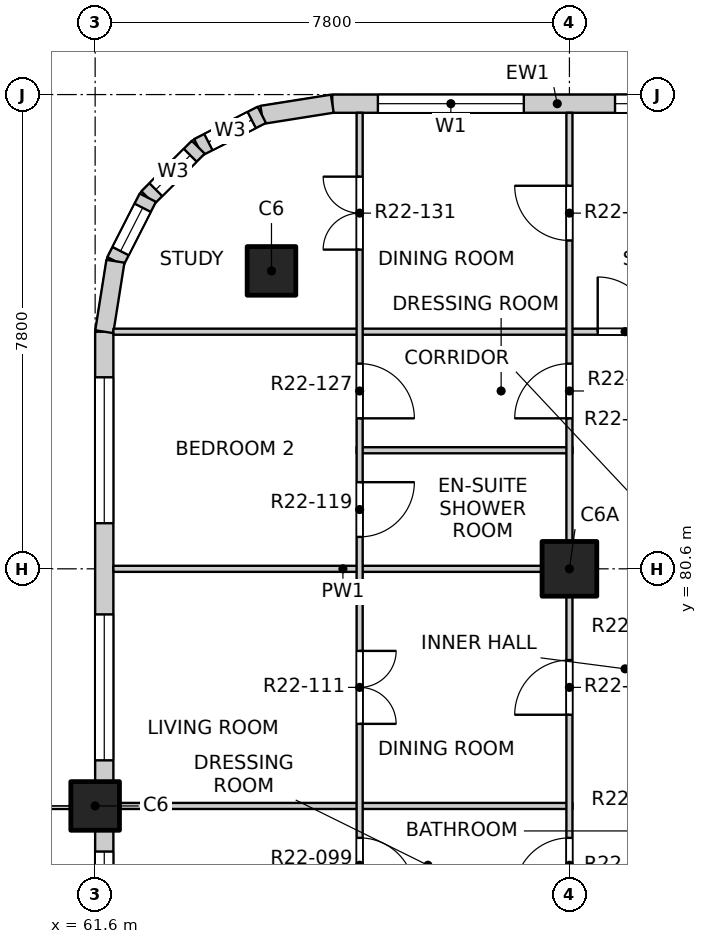
"""IFC4 building model, lengths in metres.
Left out: names, types, materials, properties, quantities, classifications, styles, units other than length and angle.
Written with IfcOpenShell. Run it as: python <this file> out.ifc"""

import sys

from ifc_helpers import new_model, si_unit, direction, frame, frame_2d, origin, origin_2d, place, context, subcontext, project, spatial, rectangle, extrude, element, fill, save


model = new_model("IFC4")
c1 = context("Model", 3, precision=1e-05, world=origin(), true_north=direction((0.0, 1.0)))
c2 = subcontext(c1, "Body", "Model", "MODEL_VIEW")
j1 = project(units=[si_unit("LENGTHUNIT", "METRE"), si_unit("PLANEANGLEUNIT", "RADIAN")], contexts=[c1])
p1 = place(None, origin())
s1 = spatial("IfcSite", under=j1, at=p1, CompositionType="ELEMENT")
p2 = place(p1, origin())
s2 = spatial("IfcBuilding", under=s1, at=p2, CompositionType="ELEMENT")
p3 = place(p2, frame((0.0, 0.0, 231.3)))
s3 = spatial("IfcBuildingStorey", under=s2, at=p3, CompositionType="ELEMENT", Elevation=231.3)
for number, where, z_axis, x_axis in (
    (1, (64.5, 85.5, -0.25), (0.0, 0.0, 1.0), (1.0, 0.0, 0.0)),
    (2, (61.6, 76.7, -0.25), (0.0, 0.0, 1.0), (1.0, 0.0, 0.0)),
):
    element("IfcColumn", number, at=place(p3, frame(where, z_axis=z_axis, x_axis=x_axis)), inside=s3, PredefinedType="COLUMN", context=c2, shape_type="SweptSolid", body=[
        extrude(rectangle(XDim=0.8, YDim=0.8, at=origin_2d()), origin(), (0.0, 0.0, 1.0), 3.4),
    ])
p4 = place(p3, frame((69.4, 80.6, -0.25), z_axis=(0.0, 0.0, 1.0), x_axis=(1.0, 0.0, 0.0)))
e3 = element("IfcColumn", 3, at=p4, inside=s3, PredefinedType="COLUMN", context=c2, shape_type="SweptSolid", body=[
    extrude(rectangle(XDim=0.9, YDim=0.9, at=origin_2d()), origin(), (0.0, 0.0, 1.0), 3.4),
])
p5 = place(p3, frame((65.5, 88.25, 0.0), z_axis=(0.0, 0.0, 1.0), x_axis=(1.0, 0.0, 0.0)))
e4 = element("IfcWall", 4, at=p5, inside=s3, PredefinedType="SOLIDWALL", context=c2, shape_type="SweptSolid", body=[
    extrude(rectangle(XDim=7.4, YDim=0.3, at=frame_2d((3.7, 0.0))), origin(), (0.0, 0.0, 1.0), 2.7),
])
p6 = place(p5, frame((0.75, 0.0, 0.9)))
e5 = element("IfcOpeningElement", 5, at=p6, cuts=e4, PredefinedType="OPENING", context=c2, shape_type="SweptSolid", body=[
    extrude(rectangle(XDim=2.4, YDim=1.8, at=frame_2d((1.2, 0.9))), frame((0.0, 0.16, 0.0), z_axis=(0.0, -1.0, 0.0), x_axis=(1.0, 0.0, 0.0)), (0.0, 0.0, 1.0), 0.32),
])
p7 = place(p5, frame((4.65, 0.0, 0.9)))
e6 = element("IfcOpeningElement", 6, at=p7, cuts=e4, PredefinedType="OPENING", context=c2, shape_type="SweptSolid", body=[
    extrude(rectangle(XDim=2.4, YDim=1.8, at=frame_2d((1.2, 0.9))), frame((0.0, 0.16, 0.0), z_axis=(0.0, -1.0, 0.0), x_axis=(1.0, 0.0, 0.0)), (0.0, 0.0, 1.0), 0.32),
])
p8 = place(p3, frame((61.75, 69.3, 0.0), z_axis=(0.0, 0.0, 1.0), x_axis=(0.0, 1.0, 0.0)))
e7 = element("IfcWall", 7, at=p8, inside=s3, PredefinedType="SOLIDWALL", context=c2, shape_type="SweptSolid", body=[
    extrude(rectangle(XDim=7.0, YDim=0.3, at=frame_2d((3.5, 0.0))), origin(), (0.0, 0.0, 1.0), 2.7),
])
p9 = place(p8, frame((0.65, 0.0, 0.0)))
e8 = element("IfcOpeningElement", 8, at=p9, cuts=e7, PredefinedType="OPENING", context=c2, shape_type="SweptSolid", body=[
    extrude(rectangle(XDim=1.8, YDim=2.4, at=frame_2d((0.9, 1.2))), frame((0.0, 0.16, 0.0), z_axis=(0.0, -1.0, 0.0), x_axis=(1.0, 0.0, 0.0)), (0.0, 0.0, 1.0), 0.32),
])
p10 = place(p8, frame((4.25, 0.0, 0.9)))
e9 = element("IfcOpeningElement", 9, at=p10, cuts=e7, PredefinedType="OPENING", context=c2, shape_type="SweptSolid", body=[
    extrude(rectangle(XDim=2.4, YDim=1.8, at=frame_2d((1.2, 0.9))), frame((0.0, 0.16, 0.0), z_axis=(0.0, -1.0, 0.0), x_axis=(1.0, 0.0, 0.0)), (0.0, 0.0, 1.0), 0.32),
])
p11 = place(p3, frame((61.75, 77.1, 0.0), z_axis=(0.0, 0.0, 1.0), x_axis=(0.0, 1.0, 0.0)))
e10 = element("IfcWall", 10, at=p11, inside=s3, PredefinedType="SOLIDWALL", context=c2, shape_type="SweptSolid", body=[
    extrude(rectangle(XDim=7.4, YDim=0.3, at=frame_2d((3.7, 0.0))), origin(), (0.0, 0.0, 1.0), 2.7),
])
p12 = place(p11, frame((0.35, 0.0, 0.9)))
e11 = element("IfcOpeningElement", 11, at=p12, cuts=e10, PredefinedType="OPENING", context=c2, shape_type="SweptSolid", body=[
    extrude(rectangle(XDim=2.4, YDim=1.8, at=frame_2d((1.2, 0.9))), frame((0.0, 0.16, 0.0), z_axis=(0.0, -1.0, 0.0), x_axis=(1.0, 0.0, 0.0)), (0.0, 0.0, 1.0), 0.32),
])
p13 = place(p11, frame((4.25, 0.0, 0.9)))
e12 = element("IfcOpeningElement", 12, at=p13, cuts=e10, PredefinedType="OPENING", context=c2, shape_type="SweptSolid", body=[
    extrude(rectangle(XDim=2.4, YDim=1.8, at=frame_2d((1.2, 0.9))), frame((0.0, 0.16, 0.0), z_axis=(0.0, -1.0, 0.0), x_axis=(1.0, 0.0, 0.0)), (0.0, 0.0, 1.0), 0.32),
])
p14 = place(p3, frame((65.5, 88.25, 0.0), z_axis=(0.0, 0.0, 1.0), x_axis=(-0.987678452879, -0.156496880861, 0.0)))
e13 = element("IfcWall", 13, at=p14, inside=s3, PredefinedType="SOLIDWALL", context=c2, shape_type="SweptSolid", body=[
    extrude(rectangle(XDim=1.173, YDim=0.3, at=frame_2d((0.586, 0.0))), origin(), (0.0, 0.0, 1.0), 2.7),
])
p15 = place(p3, frame((64.341, 88.066, 0.0), z_axis=(0.0, 0.0, 1.0), x_axis=(-0.890988677504, -0.454025524128, 0.0)))
e14 = element("IfcWall", 14, at=p15, inside=s3, PredefinedType="SOLIDWALL", context=c2, shape_type="SweptSolid", body=[
    extrude(rectangle(XDim=1.173, YDim=0.3, at=frame_2d((0.587, 0.0))), origin(), (0.0, 0.0, 1.0), 2.7),
])
p16 = place(p15, frame((0.187, 0.0, 0.9)))
e15 = element("IfcOpeningElement", 15, at=p16, cuts=e14, PredefinedType="OPENING", context=c2, shape_type="SweptSolid", body=[
    extrude(rectangle(XDim=0.8, YDim=1.2, at=frame_2d((0.4, 0.6))), frame((0.0, 0.16, 0.0), z_axis=(0.0, -1.0, 0.0), x_axis=(1.0, 0.0, 0.0)), (0.0, 0.0, 1.0), 0.32),
])
p17 = place(p3, frame((63.296, 87.534, 0.0), z_axis=(0.0, 0.0, 1.0), x_axis=(-0.707106781187, -0.707106781187, 0.0)))
e16 = element("IfcWall", 16, at=p17, inside=s3, PredefinedType="SOLIDWALL", context=c2, shape_type="SweptSolid", body=[
    extrude(rectangle(XDim=1.173, YDim=0.3, at=frame_2d((0.586, 0.0))), origin(), (0.0, 0.0, 1.0), 2.7),
])
p18 = place(p17, frame((0.187, 0.0, 0.9)))
e17 = element("IfcOpeningElement", 17, at=p18, cuts=e16, PredefinedType="OPENING", context=c2, shape_type="SweptSolid", body=[
    extrude(rectangle(XDim=0.8, YDim=1.2, at=frame_2d((0.4, 0.6))), frame((0.0, 0.16, 0.0), z_axis=(0.0, -1.0, 0.0), x_axis=(1.0, 0.0, 0.0)), (0.0, 0.0, 1.0), 0.32),
])
p19 = place(p3, frame((62.466, 86.704, 0.0), z_axis=(0.0, 0.0, 1.0), x_axis=(-0.454025524128, -0.890988677504, 0.0)))
e18 = element("IfcWall", 18, at=p19, inside=s3, PredefinedType="SOLIDWALL", context=c2, shape_type="SweptSolid", body=[
    extrude(rectangle(XDim=1.173, YDim=0.3, at=frame_2d((0.587, 0.0))), origin(), (0.0, 0.0, 1.0), 2.7),
])
p20 = place(p19, frame((0.187, 0.0, 0.9)))
e19 = element("IfcOpeningElement", 19, at=p20, cuts=e18, PredefinedType="OPENING", context=c2, shape_type="SweptSolid", body=[
    extrude(rectangle(XDim=0.8, YDim=1.2, at=frame_2d((0.4, 0.6))), frame((0.0, 0.16, 0.0), z_axis=(0.0, -1.0, 0.0), x_axis=(1.0, 0.0, 0.0)), (0.0, 0.0, 1.0), 0.32),
])
p21 = place(p3, frame((61.934, 85.659, 0.0), z_axis=(0.0, 0.0, 1.0), x_axis=(-0.156496880861, -0.987678452879, 0.0)))
e20 = element("IfcWall", 20, at=p21, inside=s3, PredefinedType="SOLIDWALL", context=c2, shape_type="SweptSolid", body=[
    extrude(rectangle(XDim=1.173, YDim=0.3, at=frame_2d((0.586, 0.0))), origin(), (0.0, 0.0, 1.0), 2.7),
])
p22 = place(p3, frame((61.9, 76.7, 0.0), z_axis=(0.0, 0.0, 1.0), x_axis=(1.0, 0.0, 0.0)))
e21 = element("IfcWall", 21, at=p22, inside=s3, PredefinedType="PARTITIONING", context=c2, shape_type="SweptSolid", body=[
    extrude(rectangle(XDim=7.55, YDim=0.1, at=frame_2d((3.775, 0.0))), origin(), (0.0, 0.0, 1.0), 2.55),
])
p23 = place(p3, frame((61.9, 80.6, 0.0), z_axis=(0.0, 0.0, 1.0), x_axis=(1.0, 0.0, 0.0)))
e22 = element("IfcWall", 22, at=p23, inside=s3, PredefinedType="PARTITIONING", context=c2, shape_type="SweptSolid", body=[
    extrude(rectangle(XDim=7.55, YDim=0.1, at=frame_2d((3.775, 0.0))), origin(), (0.0, 0.0, 1.0), 3.15),
])
p24 = place(p3, frame((65.9, 82.55, 0.0), z_axis=(0.0, 0.0, 1.0), x_axis=(1.0, 0.0, 0.0)))
e23 = element("IfcWall", 23, at=p24, inside=s3, PredefinedType="PARTITIONING", context=c2, shape_type="SweptSolid", body=[
    extrude(rectangle(XDim=3.55, YDim=0.1, at=frame_2d((1.775, 0.0))), origin(), (0.0, 0.0, 1.0), 3.15),
])
p25 = place(p3, frame((61.9, 84.5, 0.0), z_axis=(0.0, 0.0, 1.0), x_axis=(1.0, 0.0, 0.0)))
e24 = element("IfcWall", 24, at=p25, inside=s3, PredefinedType="PARTITIONING", context=c2, shape_type="SweptSolid", body=[
    extrude(rectangle(XDim=11.5, YDim=0.1, at=frame_2d((5.75, 0.0))), origin(), (0.0, 0.0, 1.0), 3.15),
])
p26 = place(p25, frame((7.965, 0.0, 0.0)))
e25 = element("IfcOpeningElement", 25, at=p26, cuts=e24, PredefinedType="OPENING", context=c2, shape_type="SweptSolid", body=[
    extrude(rectangle(XDim=0.9, YDim=2.1, at=frame_2d((0.45, 1.05))), frame((0.0, 0.06, 0.0), z_axis=(0.0, -1.0, 0.0), x_axis=(1.0, 0.0, 0.0)), (0.0, 0.0, 1.0), 0.12),
])
p27 = place(p3, frame((65.95, 72.9, 0.0), z_axis=(0.0, 0.0, 1.0), x_axis=(0.0, 1.0, 0.0)))
e26 = element("IfcWall", 26, at=p27, inside=s3, PredefinedType="PARTITIONING", context=c2, shape_type="SweptSolid", body=[
    extrude(rectangle(XDim=15.2, YDim=0.1, at=frame_2d((7.6, 0.0))), origin(), (0.0, 0.0, 1.0), 3.15),
])
p28 = place(p27, frame((0.425, 0.0, 0.0)))
e27 = element("IfcOpeningElement", 27, at=p28, cuts=e26, PredefinedType="OPENING", context=c2, shape_type="SweptSolid", body=[
    extrude(rectangle(XDim=0.9, YDim=2.1, at=frame_2d((0.45, 1.05))), frame((0.0, 0.06, 0.0), z_axis=(0.0, -1.0, 0.0), x_axis=(1.0, 0.0, 0.0)), (0.0, 0.0, 1.0), 0.12),
])
p29 = place(p27, frame((2.375, 0.0, 0.0)))
e28 = element("IfcOpeningElement", 28, at=p29, cuts=e26, PredefinedType="OPENING", context=c2, shape_type="SweptSolid", body=[
    extrude(rectangle(XDim=0.9, YDim=2.1, at=frame_2d((0.45, 1.05))), frame((0.0, 0.06, 0.0), z_axis=(0.0, -1.0, 0.0), x_axis=(1.0, 0.0, 0.0)), (0.0, 0.0, 1.0), 0.12),
])
p30 = place(p27, frame((5.15, 0.0, 0.0)))
e29 = element("IfcOpeningElement", 29, at=p30, cuts=e26, PredefinedType="OPENING", context=c2, shape_type="SweptSolid", body=[
    extrude(rectangle(XDim=1.2, YDim=2.1, at=frame_2d((0.6, 1.05))), frame((0.0, 0.06, 0.0), z_axis=(0.0, -1.0, 0.0), x_axis=(1.0, 0.0, 0.0)), (0.0, 0.0, 1.0), 0.12),
])
p31 = place(p27, frame((8.225, 0.0, 0.0)))
e30 = element("IfcOpeningElement", 30, at=p31, cuts=e26, PredefinedType="OPENING", context=c2, shape_type="SweptSolid", body=[
    extrude(rectangle(XDim=0.9, YDim=2.1, at=frame_2d((0.45, 1.05))), frame((0.0, 0.06, 0.0), z_axis=(0.0, -1.0, 0.0), x_axis=(1.0, 0.0, 0.0)), (0.0, 0.0, 1.0), 0.12),
])
p32 = place(p27, frame((10.175, 0.0, 0.0)))
e31 = element("IfcOpeningElement", 31, at=p32, cuts=e26, PredefinedType="OPENING", context=c2, shape_type="SweptSolid", body=[
    extrude(rectangle(XDim=0.9, YDim=2.1, at=frame_2d((0.45, 1.05))), frame((0.0, 0.06, 0.0), z_axis=(0.0, -1.0, 0.0), x_axis=(1.0, 0.0, 0.0)), (0.0, 0.0, 1.0), 0.12),
])
p33 = place(p27, frame((12.95, 0.0, 0.0)))
e32 = element("IfcOpeningElement", 32, at=p33, cuts=e26, PredefinedType="OPENING", context=c2, shape_type="SweptSolid", body=[
    extrude(rectangle(XDim=1.2, YDim=2.1, at=frame_2d((0.6, 1.05))), frame((0.0, 0.06, 0.0), z_axis=(0.0, -1.0, 0.0), x_axis=(1.0, 0.0, 0.0)), (0.0, 0.0, 1.0), 0.12),
])
p34 = place(p3, frame((69.4, 41.9, 0.0), z_axis=(0.0, 0.0, 1.0), x_axis=(0.0, 1.0, 0.0)))
e33 = element("IfcWall", 33, at=p34, inside=s3, PredefinedType="PARTITIONING", context=c2, shape_type="SweptSolid", body=[
    extrude(rectangle(XDim=46.2, YDim=0.1, at=frame_2d((23.1, 0.0))), origin(), (0.0, 0.0, 1.0), 3.15),
])
p35 = place(p34, frame((1.2, 0.0, 0.0)))
e34 = element("IfcOpeningElement", 34, at=p35, cuts=e33, PredefinedType="OPENING", context=c2, shape_type="SweptSolid", body=[
    extrude(rectangle(XDim=0.9, YDim=2.1, at=frame_2d((0.45, 1.05))), frame((0.0, 0.06, 0.0), z_axis=(0.0, -1.0, 0.0), x_axis=(1.0, 0.0, 0.0)), (0.0, 0.0, 1.0), 0.12),
])
p36 = place(p34, frame((5.1, 0.0, 0.0)))
e35 = element("IfcOpeningElement", 35, at=p36, cuts=e33, PredefinedType="OPENING", context=c2, shape_type="SweptSolid", body=[
    extrude(rectangle(XDim=0.9, YDim=2.1, at=frame_2d((0.45, 1.05))), frame((0.0, 0.06, 0.0), z_axis=(0.0, -1.0, 0.0), x_axis=(1.0, 0.0, 0.0)), (0.0, 0.0, 1.0), 0.12),
])
p37 = place(p34, frame((9.0, 0.0, 0.0)))
e36 = element("IfcOpeningElement", 36, at=p37, cuts=e33, PredefinedType="OPENING", context=c2, shape_type="SweptSolid", body=[
    extrude(rectangle(XDim=0.9, YDim=2.1, at=frame_2d((0.45, 1.05))), frame((0.0, 0.06, 0.0), z_axis=(0.0, -1.0, 0.0), x_axis=(1.0, 0.0, 0.0)), (0.0, 0.0, 1.0), 0.12),
])
p38 = place(p34, frame((13.85, 0.0, 0.0)))
e37 = element("IfcOpeningElement", 37, at=p38, cuts=e33, PredefinedType="OPENING", context=c2, shape_type="SweptSolid", body=[
    extrude(rectangle(XDim=0.9, YDim=2.1, at=frame_2d((0.45, 1.05))), frame((0.0, 0.06, 0.0), z_axis=(0.0, -1.0, 0.0), x_axis=(1.0, 0.0, 0.0)), (0.0, 0.0, 1.0), 0.12),
])
p39 = place(p34, frame((17.775, 0.0, 0.0)))
e38 = element("IfcOpeningElement", 38, at=p39, cuts=e33, PredefinedType="OPENING", context=c2, shape_type="SweptSolid", body=[
    extrude(rectangle(XDim=0.9, YDim=2.1, at=frame_2d((0.45, 1.05))), frame((0.0, 0.06, 0.0), z_axis=(0.0, -1.0, 0.0), x_axis=(1.0, 0.0, 0.0)), (0.0, 0.0, 1.0), 0.12),
])
p40 = place(p34, frame((21.625, 0.0, 0.0)))
e39 = element("IfcOpeningElement", 39, at=p40, cuts=e33, PredefinedType="OPENING", context=c2, shape_type="SweptSolid", body=[
    extrude(rectangle(XDim=0.9, YDim=2.1, at=frame_2d((0.45, 1.05))), frame((0.0, 0.06, 0.0), z_axis=(0.0, -1.0, 0.0), x_axis=(1.0, 0.0, 0.0)), (0.0, 0.0, 1.0), 0.12),
])
p41 = place(p34, frame((24.6, 0.0, 0.0)))
e40 = element("IfcOpeningElement", 40, at=p41, cuts=e33, PredefinedType="OPENING", context=c2, shape_type="SweptSolid", body=[
    extrude(rectangle(XDim=0.9, YDim=2.1, at=frame_2d((0.45, 1.05))), frame((0.0, 0.06, 0.0), z_axis=(0.0, -1.0, 0.0), x_axis=(1.0, 0.0, 0.0)), (0.0, 0.0, 1.0), 0.12),
])
p42 = place(p34, frame((29.425, 0.0, 0.0)))
e41 = element("IfcOpeningElement", 41, at=p42, cuts=e33, PredefinedType="OPENING", context=c2, shape_type="SweptSolid", body=[
    extrude(rectangle(XDim=0.9, YDim=2.1, at=frame_2d((0.45, 1.05))), frame((0.0, 0.06, 0.0), z_axis=(0.0, -1.0, 0.0), x_axis=(1.0, 0.0, 0.0)), (0.0, 0.0, 1.0), 0.12),
])
p43 = place(p34, frame((33.375, 0.0, 0.0)))
e42 = element("IfcOpeningElement", 42, at=p43, cuts=e33, PredefinedType="OPENING", context=c2, shape_type="SweptSolid", body=[
    extrude(rectangle(XDim=0.9, YDim=2.1, at=frame_2d((0.45, 1.05))), frame((0.0, 0.06, 0.0), z_axis=(0.0, -1.0, 0.0), x_axis=(1.0, 0.0, 0.0)), (0.0, 0.0, 1.0), 0.12),
])
p44 = place(p34, frame((36.3, 0.0, 0.0)))
e43 = element("IfcOpeningElement", 43, at=p44, cuts=e33, PredefinedType="OPENING", context=c2, shape_type="SweptSolid", body=[
    extrude(rectangle(XDim=0.9, YDim=2.1, at=frame_2d((0.45, 1.05))), frame((0.0, 0.06, 0.0), z_axis=(0.0, -1.0, 0.0), x_axis=(1.0, 0.0, 0.0)), (0.0, 0.0, 1.0), 0.12),
])
p45 = place(p34, frame((41.175, 0.0, 0.0)))
e44 = element("IfcOpeningElement", 44, at=p45, cuts=e33, PredefinedType="OPENING", context=c2, shape_type="SweptSolid", body=[
    extrude(rectangle(XDim=0.9, YDim=2.1, at=frame_2d((0.45, 1.05))), frame((0.0, 0.06, 0.0), z_axis=(0.0, -1.0, 0.0), x_axis=(1.0, 0.0, 0.0)), (0.0, 0.0, 1.0), 0.12),
])
p46 = place(p34, frame((44.1, 0.0, 0.0)))
e45 = element("IfcOpeningElement", 45, at=p46, cuts=e33, PredefinedType="OPENING", context=c2, shape_type="SweptSolid", body=[
    extrude(rectangle(XDim=0.9, YDim=2.1, at=frame_2d((0.45, 1.05))), frame((0.0, 0.06, 0.0), z_axis=(0.0, -1.0, 0.0), x_axis=(1.0, 0.0, 0.0)), (0.0, 0.0, 1.0), 0.12),
])
p47 = place(p6, origin())
e46 = element("IfcWindow", 46, at=p47, inside=s3, PartitioningType="DOUBLE_PANEL_VERTICAL", PredefinedType="WINDOW", context=c2, shape_type="SweptSolid", body=[
    extrude(rectangle(XDim=2.4, YDim=1.8, at=frame_2d((1.2, 0.9))), frame((0.0, 0.03, 0.0), z_axis=(0.0, -1.0, 0.0), x_axis=(1.0, 0.0, 0.0)), (0.0, 0.0, 1.0), 0.06),
])
fill(e5, e46)
p48 = place(p7, origin())
e47 = element("IfcWindow", 47, at=p48, inside=s3, PartitioningType="DOUBLE_PANEL_VERTICAL", PredefinedType="WINDOW", context=c2, shape_type="SweptSolid", body=[
    extrude(rectangle(XDim=2.4, YDim=1.8, at=frame_2d((1.2, 0.9))), frame((0.0, 0.03, 0.0), z_axis=(0.0, -1.0, 0.0), x_axis=(1.0, 0.0, 0.0)), (0.0, 0.0, 1.0), 0.06),
])
fill(e6, e47)
p49 = place(p10, origin())
e48 = element("IfcWindow", 48, at=p49, inside=s3, PartitioningType="DOUBLE_PANEL_VERTICAL", PredefinedType="WINDOW", context=c2, shape_type="SweptSolid", body=[
    extrude(rectangle(XDim=2.4, YDim=1.8, at=frame_2d((1.2, 0.9))), frame((0.0, 0.03, 0.0), z_axis=(0.0, -1.0, 0.0), x_axis=(1.0, 0.0, 0.0)), (0.0, 0.0, 1.0), 0.06),
])
fill(e9, e48)
p50 = place(p12, origin())
e49 = element("IfcWindow", 49, at=p50, inside=s3, PartitioningType="DOUBLE_PANEL_VERTICAL", PredefinedType="WINDOW", context=c2, shape_type="SweptSolid", body=[
    extrude(rectangle(XDim=2.4, YDim=1.8, at=frame_2d((1.2, 0.9))), frame((0.0, 0.03, 0.0), z_axis=(0.0, -1.0, 0.0), x_axis=(1.0, 0.0, 0.0)), (0.0, 0.0, 1.0), 0.06),
])
fill(e11, e49)
p51 = place(p13, origin())
e50 = element("IfcWindow", 50, at=p51, inside=s3, PartitioningType="DOUBLE_PANEL_VERTICAL", PredefinedType="WINDOW", context=c2, shape_type="SweptSolid", body=[
    extrude(rectangle(XDim=2.4, YDim=1.8, at=frame_2d((1.2, 0.9))), frame((0.0, 0.03, 0.0), z_axis=(0.0, -1.0, 0.0), x_axis=(1.0, 0.0, 0.0)), (0.0, 0.0, 1.0), 0.06),
])
fill(e12, e50)
p52 = place(p16, origin())
e51 = element("IfcWindow", 51, at=p52, inside=s3, PartitioningType="SINGLE_PANEL", PredefinedType="WINDOW", context=c2, shape_type="SweptSolid", body=[
    extrude(rectangle(XDim=0.8, YDim=1.2, at=frame_2d((0.4, 0.6))), frame((0.0, 0.03, 0.0), z_axis=(0.0, -1.0, 0.0), x_axis=(1.0, 0.0, 0.0)), (0.0, 0.0, 1.0), 0.06),
])
fill(e15, e51)
p53 = place(p18, origin())
e52 = element("IfcWindow", 52, at=p53, inside=s3, PartitioningType="SINGLE_PANEL", PredefinedType="WINDOW", context=c2, shape_type="SweptSolid", body=[
    extrude(rectangle(XDim=0.8, YDim=1.2, at=frame_2d((0.4, 0.6))), frame((0.0, 0.03, 0.0), z_axis=(0.0, -1.0, 0.0), x_axis=(1.0, 0.0, 0.0)), (0.0, 0.0, 1.0), 0.06),
])
fill(e17, e52)
p54 = place(p20, origin())
e53 = element("IfcWindow", 53, at=p54, inside=s3, PartitioningType="SINGLE_PANEL", PredefinedType="WINDOW", context=c2, shape_type="SweptSolid", body=[
    extrude(rectangle(XDim=0.8, YDim=1.2, at=frame_2d((0.4, 0.6))), frame((0.0, 0.03, 0.0), z_axis=(0.0, -1.0, 0.0), x_axis=(1.0, 0.0, 0.0)), (0.0, 0.0, 1.0), 0.06),
])
fill(e19, e53)
p55 = place(p29, origin())
e54 = element("IfcDoor", 54, at=p55, inside=s3, OperationType="SINGLE_SWING_RIGHT", PredefinedType="DOOR", context=c2, shape_type="SweptSolid", body=[
    extrude(rectangle(XDim=0.9, YDim=2.1, at=frame_2d((0.45, 1.05))), frame((0.0, 0.025, 0.0), z_axis=(0.0, -1.0, 0.0), x_axis=(1.0, 0.0, 0.0)), (0.0, 0.0, 1.0), 0.05),
])
fill(e28, e54)
p56 = place(p43, origin())
e55 = element("IfcDoor", 55, at=p56, inside=s3, OperationType="SINGLE_SWING_LEFT", PredefinedType="DOOR", context=c2, shape_type="SweptSolid", body=[
    extrude(rectangle(XDim=0.9, YDim=2.1, at=frame_2d((0.45, 1.05))), frame((0.0, 0.025, 0.0), z_axis=(0.0, -1.0, 0.0), x_axis=(1.0, 0.0, 0.0)), (0.0, 0.0, 1.0), 0.05),
])
fill(e42, e55)
p57 = place(p30, origin())
e56 = element("IfcDoor", 56, at=p57, inside=s3, OperationType="DOUBLE_DOOR_SINGLE_SWING", PredefinedType="DOOR", context=c2, shape_type="SweptSolid", body=[
    extrude(rectangle(XDim=1.2, YDim=2.1, at=frame_2d((0.6, 1.05))), frame((0.0, 0.025, 0.0), z_axis=(0.0, -1.0, 0.0), x_axis=(1.0, 0.0, 0.0)), (0.0, 0.0, 1.0), 0.05),
])
fill(e29, e56)
p58 = place(p44, origin())
e57 = element("IfcDoor", 57, at=p58, inside=s3, OperationType="SINGLE_SWING_LEFT", PredefinedType="DOOR", context=c2, shape_type="SweptSolid", body=[
    extrude(rectangle(XDim=0.9, YDim=2.1, at=frame_2d((0.45, 1.05))), frame((0.0, 0.025, 0.0), z_axis=(0.0, -1.0, 0.0), x_axis=(1.0, 0.0, 0.0)), (0.0, 0.0, 1.0), 0.05),
])
fill(e43, e57)
p59 = place(p31, origin())
e58 = element("IfcDoor", 58, at=p59, inside=s3, OperationType="SINGLE_SWING_LEFT", PredefinedType="DOOR", context=c2, shape_type="SweptSolid", body=[
    extrude(rectangle(XDim=0.9, YDim=2.1, at=frame_2d((0.45, 1.05))), frame((0.0, 0.025, 0.0), z_axis=(0.0, -1.0, 0.0), x_axis=(1.0, 0.0, 0.0)), (0.0, 0.0, 1.0), 0.05),
])
fill(e30, e58)
p60 = place(p32, origin())
e59 = element("IfcDoor", 59, at=p60, inside=s3, OperationType="SINGLE_SWING_RIGHT", PredefinedType="DOOR", context=c2, shape_type="SweptSolid", body=[
    extrude(rectangle(XDim=0.9, YDim=2.1, at=frame_2d((0.45, 1.05))), frame((0.0, 0.025, 0.0), z_axis=(0.0, -1.0, 0.0), x_axis=(1.0, 0.0, 0.0)), (0.0, 0.0, 1.0), 0.05),
])
fill(e31, e59)
p61 = place(p45, origin())
e60 = element("IfcDoor", 60, at=p61, inside=s3, OperationType="SINGLE_SWING_LEFT", PredefinedType="DOOR", context=c2, shape_type="SweptSolid", body=[
    extrude(rectangle(XDim=0.9, YDim=2.1, at=frame_2d((0.45, 1.05))), frame((0.0, 0.025, 0.0), z_axis=(0.0, -1.0, 0.0), x_axis=(1.0, 0.0, 0.0)), (0.0, 0.0, 1.0), 0.05),
])
fill(e44, e60)
p62 = place(p26, origin())
e61 = element("IfcDoor", 61, at=p62, inside=s3, OperationType="SINGLE_SWING_LEFT", PredefinedType="DOOR", context=c2, shape_type="SweptSolid", body=[
    extrude(rectangle(XDim=0.9, YDim=2.1, at=frame_2d((0.45, 1.05))), frame((0.0, 0.025, 0.0), z_axis=(0.0, -1.0, 0.0), x_axis=(1.0, 0.0, 0.0)), (0.0, 0.0, 1.0), 0.05),
])
fill(e25, e61)
p63 = place(p33, origin())
e62 = element("IfcDoor", 62, at=p63, inside=s3, OperationType="DOUBLE_DOOR_SINGLE_SWING", PredefinedType="DOOR", context=c2, shape_type="SweptSolid", body=[
    extrude(rectangle(XDim=1.2, YDim=2.1, at=frame_2d((0.6, 1.05))), frame((0.0, 0.025, 0.0), z_axis=(0.0, -1.0, 0.0), x_axis=(1.0, 0.0, 0.0)), (0.0, 0.0, 1.0), 0.05),
])
fill(e32, e62)
p64 = place(p46, origin())
e63 = element("IfcDoor", 63, at=p64, inside=s3, OperationType="SINGLE_SWING_RIGHT", PredefinedType="DOOR", context=c2, shape_type="SweptSolid", body=[
    extrude(rectangle(XDim=0.9, YDim=2.1, at=frame_2d((0.45, 1.05))), frame((0.0, 0.025, 0.0), z_axis=(0.0, -1.0, 0.0), x_axis=(1.0, 0.0, 0.0)), (0.0, 0.0, 1.0), 0.05),
])
fill(e45, e63)
save(model, sys.argv[1])
